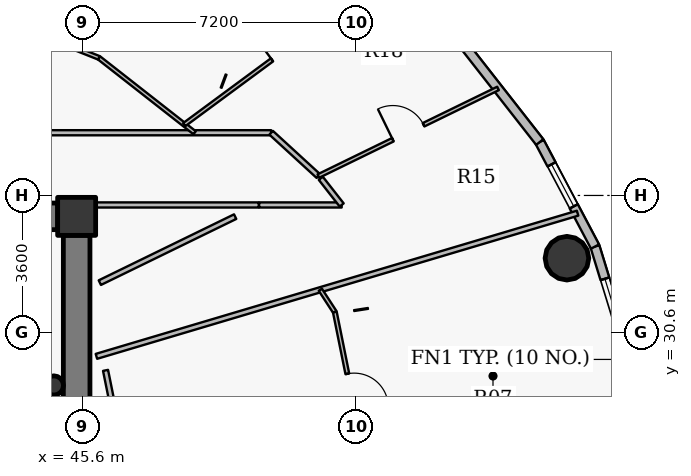
"""IFC4 building model, lengths in metres.
Left out: names, types, materials, properties, quantities, classifications, styles, units other than length and angle.
Written with IfcOpenShell. Run it as: python <this file> out.ifc"""

import sys

from ifc_helpers import new_model, si_unit, direction, frame, frame_2d, origin, origin_2d, place, context, subcontext, project, spatial, rectangle, hollow_circle, extrude, source, transform, mapped, element, fill, save


model = new_model("IFC4")
c1 = context("Model", 3, precision=1e-05, world=origin(), true_north=direction((0.0, 1.0)))
c2 = subcontext(c1, "Body", "Model", "MODEL_VIEW")
j1 = project(units=[si_unit("LENGTHUNIT", "METRE"), si_unit("PLANEANGLEUNIT", "RADIAN")], contexts=[c1])
p1 = place(None, origin())
s1 = spatial("IfcSite", under=j1, at=p1, CompositionType="ELEMENT")
p2 = place(p1, origin())
s2 = spatial("IfcBuilding", under=s1, at=p2, CompositionType="ELEMENT")
p3 = place(p2, frame((0.0, 0.0, 232.8)))
s3 = spatial("IfcBuildingStorey", under=s2, at=p3, CompositionType="ELEMENT", Elevation=232.8)
p4 = place(p3, frame((45.45, 33.65, 0.0), z_axis=(0.0, 0.0, 1.0), x_axis=(1.0, 0.0, 0.0)))
e1 = element("IfcColumn", 1, at=p4, inside=s3, PredefinedType="COLUMN", context=c2, shape_type="SweptSolid", body=[
    extrude(rectangle(XDim=1.0, YDim=1.0, at=origin_2d()), origin(), (0.0, 0.0, 1.0), 3.75),
])
p5 = place(p3, frame((27.05, 33.65, 0.0), z_axis=(0.0, 0.0, 1.0), x_axis=(1.0, 0.0, 0.0)))
e2 = element("IfcWall", 2, at=p5, inside=s3, PredefinedType="SHEAR", context=c2, shape_type="SweptSolid", body=[
    extrude(rectangle(XDim=17.9, YDim=0.7, at=frame_2d((8.95, 0.0))), origin(), (0.0, 0.0, 1.0), 3.05),
])
p6 = place(p5, frame((13.675, 0.0, 0.0)))
e3 = element("IfcOpeningElement", 3, at=p6, cuts=e2, PredefinedType="OPENING", context=c2, shape_type="SweptSolid", body=[
    extrude(rectangle(XDim=1.15, YDim=2.15, at=origin_2d()), frame((0.575, 0.36, 1.075), z_axis=(0.0, -1.0, 0.0), x_axis=(1.0, 0.0, 0.0)), (0.0, 0.0, 1.0), 0.72),
])
p7 = place(p3, frame((45.45, 33.15, 0.0), z_axis=(0.0, 0.0, 1.0), x_axis=(0.0, -1.0, 0.0)))
e4 = element("IfcWall", 4, at=p7, inside=s3, PredefinedType="SHEAR", context=c2, shape_type="SweptSolid", body=[
    extrude(rectangle(XDim=12.3, YDim=0.7, at=frame_2d((6.15, 0.0))), origin(), (0.0, 0.0, 1.0), 3.05),
])
p8 = place(p3, frame((58.351, 32.549, 0.0), z_axis=(0.0, 0.0, 1.0), x_axis=(1.0, 0.0, 0.0)))
e5 = element("IfcColumn", 5, at=p8, inside=s3, PredefinedType="COLUMN", context=c2, shape_type="SweptSolid", body=[
    extrude(hollow_circle(Radius=0.575, WallThickness=0.036, at=origin_2d()), origin(), (0.0, 0.0, 1.0), 3.75),
])
p9 = place(p3, frame((44.85, 29.2, 0.0), z_axis=(0.0, 0.0, 1.0), x_axis=(1.0, 0.0, 0.0)))
e6 = element("IfcColumn", 6, at=p9, inside=s3, PredefinedType="COLUMN", context=c2, shape_type="SweptSolid", body=[
    extrude(hollow_circle(Radius=0.254, WallThickness=0.02, at=origin_2d()), origin(), (0.0, 0.0, 1.0), 3.75),
])
p10 = place(p3, frame((59.09, 32.856, 0.0), z_axis=(0.0, 0.0, 1.0), x_axis=(0.293132907334, -0.95607170162, 0.0)))
e7 = element("IfcWall", 7, at=p10, inside=s3, PredefinedType="SOLIDWALL", context=c2, shape_type="SweptSolid", body=[
    extrude(rectangle(XDim=3.025, YDim=0.24, at=frame_2d((1.512, 0.0))), origin(), (0.0, 0.0, 1.0), 3.5),
])
p11 = place(p10, frame((0.887, 0.0, 0.9)))
e8 = element("IfcOpeningElement", 8, at=p11, cuts=e7, PredefinedType="OPENING", context=c2, shape_type="SweptSolid", body=[
    extrude(rectangle(XDim=1.25, YDim=1.65, at=origin_2d()), frame((0.625, 0.13, 0.825), z_axis=(0.0, -1.0, 0.0), x_axis=(1.0, 0.0, 0.0)), (0.0, 0.0, 1.0), 0.26),
])
p12 = place(p3, frame((57.636, 35.605, 0.0), z_axis=(0.0, 0.0, 1.0), x_axis=(0.46766049993, -0.883908172157, 0.0)))
e9 = element("IfcWall", 9, at=p12, inside=s3, PredefinedType="SOLIDWALL", context=c2, shape_type="SweptSolid", body=[
    extrude(rectangle(XDim=3.11, YDim=0.24, at=frame_2d((1.555, 0.0))), origin(), (0.0, 0.0, 1.0), 3.5),
])
p13 = place(p12, frame((0.664, 0.0, 0.9)))
e10 = element("IfcOpeningElement", 10, at=p13, cuts=e9, PredefinedType="OPENING", context=c2, shape_type="SweptSolid", body=[
    extrude(rectangle(XDim=1.25, YDim=1.65, at=origin_2d()), frame((0.625, 0.13, 0.825), z_axis=(0.0, -1.0, 0.0), x_axis=(1.0, 0.0, 0.0)), (0.0, 0.0, 1.0), 0.26),
])
p14 = place(p3, frame((55.648, 38.145, 0.0), z_axis=(0.0, 0.0, 1.0), x_axis=(0.616312344705, -0.787501805562, 0.0)))
e11 = element("IfcWall", 11, at=p14, inside=s3, PredefinedType="SOLIDWALL", context=c2, shape_type="SweptSolid", body=[
    extrude(rectangle(XDim=3.225, YDim=0.24, at=frame_2d((1.612, 0.0))), origin(), (0.0, 0.0, 1.0), 3.5),
])
p15 = place(p3, frame((24.35, 35.85, 0.0), z_axis=(0.0, 0.0, 1.0), x_axis=(1.0, 0.0, 0.0)))
e12 = element("IfcWall", 12, at=p15, inside=s3, PredefinedType="PARTITIONING", context=c2, shape_type="SweptSolid", body=[
    extrude(rectangle(XDim=26.218, YDim=0.135, at=frame_2d((13.109, 0.0))), origin(), (0.0, 0.0, 1.0), 2.935),
])
p16 = place(p15, frame((3.172, 0.0, 0.0)))
e13 = element("IfcOpeningElement", 13, at=p16, cuts=e12, PredefinedType="OPENING", context=c2, shape_type="SweptSolid", body=[
    extrude(rectangle(XDim=1.0, YDim=2.15, at=origin_2d()), frame((0.5, 0.078, 1.075), z_axis=(0.0, -1.0, 0.0), x_axis=(1.0, 0.0, 0.0)), (0.0, 0.0, 1.0), 0.155),
])
p17 = place(p15, frame((18.306, 0.0, 0.0)))
e14 = element("IfcOpeningElement", 14, at=p17, cuts=e12, PredefinedType="OPENING", context=c2, shape_type="SweptSolid", body=[
    extrude(rectangle(XDim=1.0, YDim=2.15, at=origin_2d()), frame((0.5, 0.078, 1.075), z_axis=(0.0, -1.0, 0.0), x_axis=(1.0, 0.0, 0.0)), (0.0, 0.0, 1.0), 0.155),
])
p18 = place(p3, frame((43.812, 38.708, 0.0), z_axis=(0.0, 0.0, 1.0), x_axis=(0.928806399166, -0.370565342239, 0.0)))
e15 = element("IfcWall", 15, at=p18, inside=s3, PredefinedType="PARTITIONING", context=c2, shape_type="SweptSolid", body=[
    extrude(rectangle(XDim=2.397, YDim=0.1, at=frame_2d((1.199, 0.0))), origin(), (0.0, 0.0, 1.0), 2.935),
])
p19 = place(p3, frame((45.97, 29.967, 0.0), z_axis=(0.0, 0.0, 1.0), x_axis=(0.958474934199, 0.285176788174, 0.0)))
e16 = element("IfcWall", 16, at=p19, inside=s3, PredefinedType="PARTITIONING", context=c2, shape_type="SweptSolid", body=[
    extrude(rectangle(XDim=13.21, YDim=0.135, at=frame_2d((6.605, 0.0))), origin(), (0.0, 0.0, 1.0), 2.985),
])
p20 = place(p3, frame((46.039, 37.819, 0.0), z_axis=(0.0, 0.0, 1.0), x_axis=(0.787364681479, -0.616487516791, 0.0)))
e17 = element("IfcWall", 17, at=p20, inside=s3, PredefinedType="PARTITIONING", context=c2, shape_type="SweptSolid", body=[
    extrude(rectangle(XDim=3.195, YDim=0.1, at=frame_2d((1.597, 0.0))), origin(), (0.0, 0.0, 1.0), 2.935),
])
p21 = place(p3, frame((48.281, 36.064, 0.0), z_axis=(0.0, 0.0, 1.0), x_axis=(0.804612975085, 0.593799596097, 0.0)))
e18 = element("IfcWall", 18, at=p21, inside=s3, PredefinedType="PARTITIONING", context=c2, shape_type="SweptSolid", body=[
    extrude(rectangle(XDim=6.64, YDim=0.1, at=frame_2d((3.32, 0.0))), origin(), (0.0, 0.0, 1.0), 2.985),
])
p22 = place(p21, frame((2.87, 0.0, 0.0)))
e19 = element("IfcOpeningElement", 19, at=p22, cuts=e18, PredefinedType="OPENING", context=c2, shape_type="SweptSolid", body=[
    extrude(rectangle(XDim=0.9, YDim=2.1, at=origin_2d()), frame((0.45, 0.06, 1.05), z_axis=(0.0, -1.0, 0.0), x_axis=(1.0, 0.0, 0.0)), (0.0, 0.0, 1.0), 0.12),
])
p23 = place(p3, frame((50.251, 33.95, 0.0), z_axis=(0.0, 0.0, 1.0), x_axis=(1.0, 0.0, 0.0)))
e20 = element("IfcWall", 20, at=p23, inside=s3, PredefinedType="PARTITIONING", context=c2, shape_type="SweptSolid", body=[
    extrude(rectangle(XDim=2.172, YDim=0.135, at=frame_2d((1.086, 0.0))), origin(), (0.0, 0.0, 1.0), 3.5),
])
p24 = place(p3, frame((50.568, 35.85, 0.0), z_axis=(0.0, 0.0, 1.0), x_axis=(0.737130103714, -0.675750849202, 0.0)))
e21 = element("IfcWall", 21, at=p24, inside=s3, PredefinedType="PARTITIONING", context=c2, shape_type="SweptSolid", body=[
    extrude(rectangle(XDim=1.687, YDim=0.135, at=frame_2d((0.843, 0.0))), origin(), (0.0, 0.0, 1.0), 3.5),
])
p25 = place(p3, frame((51.811, 34.71, 0.0), z_axis=(0.0, 0.0, 1.0), x_axis=(0.89880279574, 0.438353207322, 0.0)))
e22 = element("IfcWall", 22, at=p25, inside=s3, PredefinedType="PARTITIONING", context=c2, shape_type="SweptSolid", body=[
    extrude(rectangle(XDim=5.259, YDim=0.1, at=frame_2d((2.63, 0.0))), origin(), (0.0, 0.0, 1.0), 2.985),
])
p26 = place(p25, frame((2.18, 0.0, 0.0)))
e23 = element("IfcOpeningElement", 23, at=p26, cuts=e22, PredefinedType="OPENING", context=c2, shape_type="SweptSolid", body=[
    extrude(rectangle(XDim=0.9, YDim=2.1, at=origin_2d()), frame((0.45, 0.06, 1.05), z_axis=(0.0, -1.0, 0.0), x_axis=(1.0, 0.0, 0.0)), (0.0, 0.0, 1.0), 0.12),
])
p27 = place(p3, frame((51.862, 31.719, 0.0), z_axis=(0.0, 0.0, 1.0), x_axis=(0.545576382868, -0.838061101863, 0.0)))
e24 = element("IfcWall", 24, at=p27, inside=s3, PredefinedType="PARTITIONING", context=c2, shape_type="SweptSolid", body=[
    extrude(rectangle(XDim=0.7, YDim=0.1, at=frame_2d((0.35, 0.0))), origin(), (0.0, 0.0, 1.0), 2.935),
])
p28 = place(p3, frame((51.874, 34.653, 0.0), z_axis=(0.0, 0.0, 1.0), x_axis=(0.61628613448, -0.787522317429, 0.0)))
e25 = element("IfcWall", 25, at=p28, inside=s3, PredefinedType="PARTITIONING", context=c2, shape_type="SweptSolid", body=[
    extrude(rectangle(XDim=0.893, YDim=0.135, at=frame_2d((0.446, 0.0))), origin(), (0.0, 0.0, 1.0), 3.5),
])
p29 = place(p3, frame((52.244, 31.133, 0.0), z_axis=(0.0, 0.0, 1.0), x_axis=(0.198264809747, -0.980148491411, 0.0)))
e26 = element("IfcWall", 26, at=p29, inside=s3, PredefinedType="PARTITIONING", context=c2, shape_type="SweptSolid", body=[
    extrude(rectangle(XDim=4.216, YDim=0.1, at=frame_2d((2.108, 0.0))), origin(), (0.0, 0.0, 1.0), 2.935),
])
p30 = place(p29, frame((1.658, 0.0, 0.0)))
e27 = element("IfcOpeningElement", 27, at=p30, cuts=e26, PredefinedType="OPENING", context=c2, shape_type="SweptSolid", body=[
    extrude(rectangle(XDim=0.9, YDim=2.1, at=origin_2d()), frame((0.45, 0.06, 1.05), z_axis=(0.0, -1.0, 0.0), x_axis=(1.0, 0.0, 0.0)), (0.0, 0.0, 1.0), 0.12),
])
p31 = place(p3, frame((50.241, 33.95, 0.0), z_axis=(0.0, 0.0, 1.0), x_axis=(-1.0, 0.0, 0.0)))
e28 = element("IfcWall", 28, at=p31, inside=s3, PredefinedType="PARTITIONING", context=c2, shape_type="SweptSolid", body=[
    extrude(rectangle(XDim=4.441, YDim=0.135, at=frame_2d((2.221, 0.0))), origin(), (0.0, 0.0, 1.0), 3.5),
])
p32 = place(p3, frame((45.79, 34.0, 0.0), z_axis=(0.0, 0.0, 1.0), x_axis=(-1.0, 0.0, 0.0)))
e29 = element("IfcWall", 29, at=p32, inside=s3, PredefinedType="PARTITIONING", context=c2, shape_type="SweptSolid", body=[
    extrude(rectangle(XDim=0.83, YDim=0.135, at=frame_2d((0.415, 0.0))), origin(), (0.0, 0.0, 1.0), 2.935),
])
p33 = place(p3, frame((46.736, 27.0, 0.0), z_axis=(0.0, 0.0, 1.0), x_axis=(-0.198330009585, 0.980135300506, 0.0)))
e30 = element("IfcWall", 30, at=p33, inside=s3, PredefinedType="PARTITIONING", context=c2, shape_type="SweptSolid", body=[
    extrude(rectangle(XDim=2.65, YDim=0.135, at=frame_2d((1.325, 0.0))), origin(), (0.0, 0.0, 1.0), 2.935),
])
p34 = place(p3, frame((46.06, 31.906, 0.0), z_axis=(0.0, 0.0, 1.0), x_axis=(0.898819963923, 0.438318003797, 0.0)))
e31 = element("IfcWall", 31, at=p34, inside=s3, PredefinedType="PARTITIONING", context=c2, shape_type="SweptSolid", body=[
    extrude(rectangle(XDim=3.962, YDim=0.135, at=frame_2d((1.981, 0.0))), origin(), (0.0, 0.0, 1.0), 3.5),
])
m1 = source(origin(), c2, "Body", "SweptSolid", [
    extrude(rectangle(XDim=1.25, YDim=1.65, at=origin_2d()), frame((0.625, 0.03, 0.825), z_axis=(0.0, -1.0, 0.0), x_axis=(1.0, 0.0, 0.0)), (0.0, 0.0, 1.0), 0.06),
])
p35 = place(p11, origin())
e32 = element("IfcWindow", 32, at=p35, inside=s3, PartitioningType="SINGLE_PANEL", PredefinedType="WINDOW", context=c2, shape_type="MappedRepresentation", body=[
    mapped(m1, transform((0.0, 0.0, 0.0), x_axis=(1.0, 0.0, 0.0), y_axis=(0.0, 1.0, 0.0), z_axis=(0.0, 0.0, 1.0), scale=1.0)),
])
fill(e8, e32)
p36 = place(p13, origin())
e33 = element("IfcWindow", 33, at=p36, inside=s3, PartitioningType="SINGLE_PANEL", PredefinedType="WINDOW", context=c2, shape_type="MappedRepresentation", body=[
    mapped(m1, transform((0.0, 0.0, 0.0), x_axis=(1.0, 0.0, 0.0), y_axis=(0.0, 1.0, 0.0), z_axis=(0.0, 0.0, 1.0), scale=1.0)),
])
fill(e10, e33)
m2 = source(origin(), c2, "Body", "SweptSolid", [
    extrude(rectangle(XDim=0.9, YDim=2.1, at=origin_2d()), frame((0.45, 0.025, 1.05), z_axis=(0.0, -1.0, 0.0), x_axis=(1.0, 0.0, 0.0)), (0.0, 0.0, 1.0), 0.05),
])
p37 = place(p30, origin())
e34 = element("IfcDoor", 34, at=p37, inside=s3, OperationType="SINGLE_SWING_RIGHT", PredefinedType="DOOR", context=c2, shape_type="MappedRepresentation", body=[
    mapped(m2, transform((0.0, 0.0, 0.0), x_axis=(1.0, 0.0, 0.0), y_axis=(0.0, 1.0, 0.0), z_axis=(0.0, 0.0, 1.0), scale=1.0)),
])
fill(e27, e34)
p38 = place(p22, origin())
e35 = element("IfcDoor", 35, at=p38, inside=s3, OperationType="SINGLE_SWING_LEFT", PredefinedType="DOOR", context=c2, shape_type="MappedRepresentation", body=[
    mapped(m2, transform((0.0, 0.0, 0.0), x_axis=(1.0, 0.0, 0.0), y_axis=(0.0, 1.0, 0.0), z_axis=(0.0, 0.0, 1.0), scale=1.0)),
])
fill(e19, e35)
p39 = place(p26, origin())
e36 = element("IfcDoor", 36, at=p39, inside=s3, OperationType="SINGLE_SWING_LEFT", PredefinedType="DOOR", context=c2, shape_type="MappedRepresentation", body=[
    mapped(m2, transform((0.0, 0.0, 0.0), x_axis=(1.0, 0.0, 0.0), y_axis=(0.0, 1.0, 0.0), z_axis=(0.0, 0.0, 1.0), scale=1.0)),
])
fill(e23, e36)
save(model, sys.argv[1])
